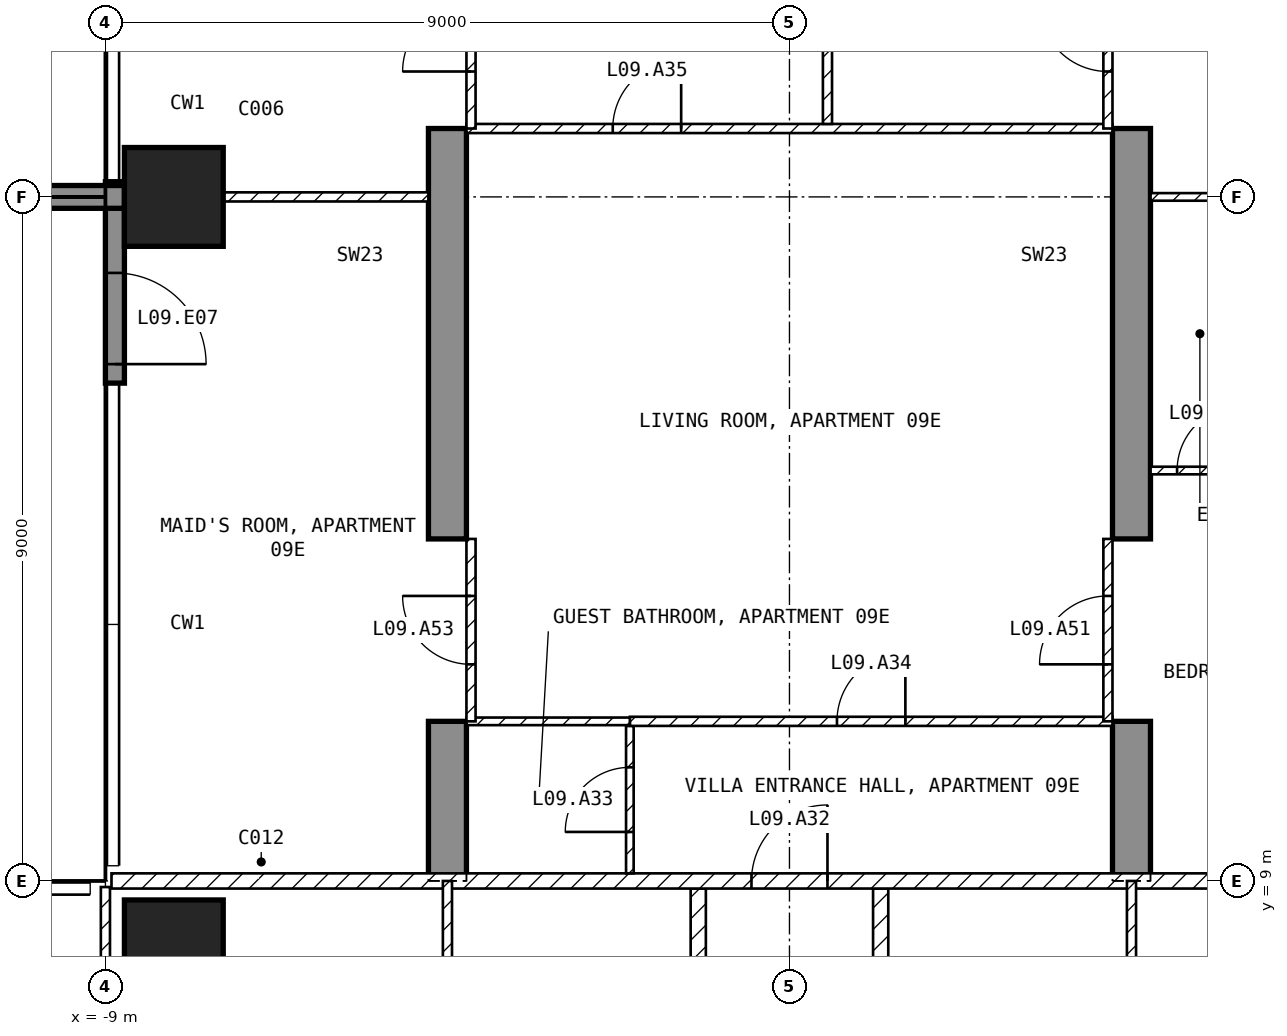
"""IFC4 building model, lengths in metres.
Left out: names, types, materials, properties, quantities, classifications, styles, units other than length and angle.
Written with IfcOpenShell. Run it as: python <this file> out.ifc"""

import sys

from ifc_helpers import new_model, si_unit, direction, frame, frame_2d, origin, origin_2d, place, context, subcontext, project, spatial, polyline, rectangle, outline, extrude, element, fill, save


model = new_model("IFC4")
c1 = context("Model", 3, precision=1e-05, world=origin(), true_north=direction((0.0, 1.0)))
c2 = subcontext(c1, "Body", "Model", "MODEL_VIEW")
j1 = project(units=[si_unit("LENGTHUNIT", "METRE"), si_unit("PLANEANGLEUNIT", "RADIAN")], contexts=[c1])
p1 = place(None, origin())
s1 = spatial("IfcSite", under=j1, at=p1, CompositionType="ELEMENT")
p2 = place(p1, origin())
s2 = spatial("IfcBuilding", under=s1, at=p2, CompositionType="ELEMENT")
p3 = place(p2, frame((0.0, 0.0, 50.5)))
s3 = spatial("IfcBuildingStorey", under=s2, at=p3, CompositionType="ELEMENT", Elevation=50.5)
for number, where, z_axis, x_axis in (
    (1, (-8.1, 8.1, -0.25), (0.0, 0.0, 1.0), (1.0, 0.0, 0.0)),
    (2, (-8.1, 18.0, -0.25), (0.0, 0.0, 1.0), (1.0, 0.0, 0.0)),
):
    element("IfcColumn", number, at=place(p3, frame(where, z_axis=z_axis, x_axis=x_axis)), inside=s3, PredefinedType="COLUMN", context=c2, shape_type="SweptSolid", body=[
        extrude(rectangle(XDim=1.3, YDim=1.3, at=origin_2d()), origin(), (0.0, 0.0, 1.0), 3.5),
    ])
for number, where, z_axis, x_axis in (
    (3, (-4.75, 9.0, -0.25), (1.0, 0.0, 0.0), (0.0, 1.0, 0.0)),
    (4, (4.25, 9.0, -0.25), (1.0, 0.0, 0.0), (0.0, 1.0, 0.0)),
):
    element("IfcWall", number, at=place(p3, frame(where, z_axis=z_axis, x_axis=x_axis)), inside=s3, PredefinedType="SHEAR", context=c2, shape_type="SweptSolid", body=[
        extrude(outline(polyline([(0.0, 0.0), (2.1, 0.0), (2.1, 2.65), (4.5, 2.65), (4.5, 0.0), (9.9, 0.0), (9.9, 2.65), (12.3, 2.65), (12.3, 0.0), (16.45, 0.0), (16.45, 3.5), (0.0, 3.5), (0.0, 0.0)])), origin(), (0.0, 0.0, 1.0), 0.5),
    ])
p4 = place(p3, frame((-8.875, 18.2, 0.0), z_axis=(0.0, 0.0, 1.0), x_axis=(0.0, -1.0, 0.0)))
e5 = element("IfcWall", 5, at=p4, inside=s3, PredefinedType="SOLIDWALL", context=c2, shape_type="SweptSolid", body=[
    extrude(rectangle(XDim=2.65, YDim=0.25, at=frame_2d((1.325, 0.0))), origin(), (0.0, 0.0, 1.0), 3.25),
])
p5 = place(p4, frame((1.2, 0.0, 0.0)))
e6 = element("IfcOpeningElement", 6, at=p5, cuts=e5, PredefinedType="OPENING", context=c2, shape_type="SweptSolid", body=[
    extrude(rectangle(XDim=1.2, YDim=2.4, at=frame_2d((0.6, 1.2))), frame((0.0, 0.135, 0.0), z_axis=(0.0, -1.0, 0.0), x_axis=(1.0, 0.0, 0.0)), (0.0, 0.0, 1.0), 0.27),
])
p6 = place(p3, frame((-8.75, 18.0, 0.0), z_axis=(0.0, 0.0, 1.0), x_axis=(-1.0, 0.0, 0.0)))
e7 = element("IfcWall", 7, at=p6, inside=s3, PredefinedType="SOLIDWALL", context=c2, shape_type="SweptSolid", body=[
    extrude(rectangle(XDim=2.95, YDim=0.3, at=frame_2d((1.475, 0.0))), origin(), (0.0, 0.0, 1.0), 3.25),
])
for number, where, z_axis, x_axis in (
    (8, (1.2, 8.9, 0.0), (0.0, 0.0, 1.0), (0.0, -1.0, 0.0)),
    (9, (-1.2, 1.3, 0.0), (0.0, 0.0, 1.0), (0.0, 1.0, 0.0)),
):
    element("IfcWall", number, at=place(p3, frame(where, z_axis=z_axis, x_axis=x_axis)), inside=s3, PredefinedType="PARTITIONING", context=c2, shape_type="SweptSolid", body=[
        extrude(rectangle(XDim=7.6, YDim=0.2, at=frame_2d((3.8, 0.0))), origin(), (0.0, 0.0, 1.0), 3.25),
    ])
p7 = place(p3, frame((-8.92, 9.0, 0.0), z_axis=(0.0, 0.0, 1.0), x_axis=(1.0, 0.0, 0.0)))
e10 = element("IfcWall", 10, at=p7, inside=s3, PredefinedType="PARTITIONING", context=c2, shape_type="SweptSolid", body=[
    extrude(rectangle(XDim=17.84, YDim=0.2, at=frame_2d((8.92, 0.0))), origin(), (0.0, 0.0, 1.0), 3.25),
])
p8 = place(p7, frame((8.42, 0.0, 0.0)))
e11 = element("IfcOpeningElement", 11, at=p8, cuts=e10, PredefinedType="OPENING", context=c2, shape_type="SweptSolid", body=[
    extrude(rectangle(XDim=1.0, YDim=2.1, at=frame_2d((0.5, 1.05))), frame((0.0, 0.11, 0.0), z_axis=(0.0, -1.0, 0.0), x_axis=(1.0, 0.0, 0.0)), (0.0, 0.0, 1.0), 0.22),
])
p9 = place(p3, frame((4.5, 1.3, 0.0), z_axis=(0.0, 0.0, 1.0), x_axis=(0.0, 1.0, 0.0)))
e12 = element("IfcWall", 12, at=p9, inside=s3, PredefinedType="PARTITIONING", context=c2, shape_type="SweptSolid", body=[
    extrude(rectangle(XDim=7.7, YDim=0.12, at=frame_2d((3.85, 0.0))), origin(), (0.0, 0.0, 1.0), 3.25),
])
p10 = place(p9, frame((3.4, 0.0, 0.0)))
e13 = element("IfcOpeningElement", 13, at=p10, cuts=e12, PredefinedType="OPENING", context=c2, shape_type="SweptSolid", body=[
    extrude(rectangle(XDim=0.9, YDim=2.1, at=frame_2d((0.45, 1.05))), frame((0.0, 0.07, 0.0), z_axis=(0.0, -1.0, 0.0), x_axis=(1.0, 0.0, 0.0)), (0.0, 0.0, 1.0), 0.14),
])
p11 = place(p3, frame((-9.0, 8.92, 0.0), z_axis=(0.0, 0.0, 1.0), x_axis=(0.0, -1.0, 0.0)))
e14 = element("IfcWall", 14, at=p11, inside=s3, PredefinedType="PARTITIONING", context=c2, shape_type="SweptSolid", body=[
    extrude(rectangle(XDim=7.62, YDim=0.12, at=frame_2d((3.81, 0.0))), origin(), (0.0, 0.0, 1.0), 3.25),
])
p12 = place(p11, frame((2.67, 0.0, 0.0)))
e15 = element("IfcOpeningElement", 15, at=p12, cuts=e14, PredefinedType="OPENING", context=c2, shape_type="SweptSolid", body=[
    extrude(rectangle(XDim=0.9, YDim=2.1, at=frame_2d((0.45, 1.05))), frame((0.0, 0.07, 0.0), z_axis=(0.0, -1.0, 0.0), x_axis=(1.0, 0.0, 0.0)), (0.0, 0.0, 1.0), 0.14),
])
p13 = place(p3, frame((-4.5, 9.0, 0.0), z_axis=(0.0, 0.0, 1.0), x_axis=(0.0, -1.0, 0.0)))
e16 = element("IfcWall", 16, at=p13, inside=s3, PredefinedType="PARTITIONING", context=c2, shape_type="SweptSolid", body=[
    extrude(rectangle(XDim=3.9, YDim=0.12, at=frame_2d((1.95, 0.0))), origin(), (0.0, 0.0, 1.0), 3.25),
])
p14 = place(p13, frame((1.5, 0.0, 0.0)))
e17 = element("IfcOpeningElement", 17, at=p14, cuts=e16, PredefinedType="OPENING", context=c2, shape_type="SweptSolid", body=[
    extrude(rectangle(XDim=0.9, YDim=2.1, at=frame_2d((0.45, 1.05))), frame((0.0, 0.07, 0.0), z_axis=(0.0, -1.0, 0.0), x_axis=(1.0, 0.0, 0.0)), (0.0, 0.0, 1.0), 0.14),
])
p15 = place(p3, frame((-2.1, 9.1, 0.0), z_axis=(0.0, 0.0, 1.0), x_axis=(0.0, 1.0, 0.0)))
e18 = element("IfcWall", 18, at=p15, inside=s3, PredefinedType="PARTITIONING", context=c2, shape_type="SweptSolid", body=[
    extrude(rectangle(XDim=1.94, YDim=0.1, at=frame_2d((0.97, 0.0))), origin(), (0.0, 0.0, 1.0), 3.25),
])
p16 = place(p15, frame((0.545, 0.0, 0.0)))
e19 = element("IfcOpeningElement", 19, at=p16, cuts=e18, PredefinedType="OPENING", context=c2, shape_type="SweptSolid", body=[
    extrude(rectangle(XDim=0.85, YDim=2.1, at=frame_2d((0.425, 1.05))), frame((0.0, 0.06, 0.0), z_axis=(0.0, -1.0, 0.0), x_axis=(1.0, 0.0, 0.0)), (0.0, 0.0, 1.0), 0.12),
])
p17 = place(p3, frame((-2.1, 11.1, 0.0), z_axis=(0.0, 0.0, 1.0), x_axis=(1.0, 0.0, 0.0)))
e20 = element("IfcWall", 20, at=p17, inside=s3, PredefinedType="PARTITIONING", context=c2, shape_type="SweptSolid", body=[
    extrude(rectangle(XDim=6.35, YDim=0.12, at=frame_2d((3.175, 0.0))), origin(), (0.0, 0.0, 1.0), 3.25),
])
p18 = place(p17, frame((2.725, 0.0, 0.0)))
e21 = element("IfcOpeningElement", 21, at=p18, cuts=e20, PredefinedType="OPENING", context=c2, shape_type="SweptSolid", body=[
    extrude(rectangle(XDim=0.9, YDim=2.1, at=frame_2d((0.45, 1.05))), frame((0.0, 0.07, 0.0), z_axis=(0.0, -1.0, 0.0), x_axis=(1.0, 0.0, 0.0)), (0.0, 0.0, 1.0), 0.14),
])
p19 = place(p3, frame((-4.25, 11.1, 0.0), z_axis=(0.0, 0.0, 1.0), x_axis=(1.0, 0.0, 0.0)))
e22 = element("IfcWall", 22, at=p19, inside=s3, PredefinedType="PARTITIONING", context=c2, shape_type="SweptSolid", body=[
    extrude(rectangle(XDim=2.15, YDim=0.1, at=frame_2d((1.075, 0.0))), origin(), (0.0, 0.0, 1.0), 3.25),
])
p20 = place(p3, frame((-4.25, 18.9, 0.0), z_axis=(0.0, 0.0, 1.0), x_axis=(1.0, 0.0, 0.0)))
e23 = element("IfcWall", 23, at=p20, inside=s3, PredefinedType="PARTITIONING", context=c2, shape_type="SweptSolid", body=[
    extrude(rectangle(XDim=8.5, YDim=0.12, at=frame_2d((4.25, 0.0))), origin(), (0.0, 0.0, 1.0), 3.25),
])
p21 = place(p20, frame((1.925, 0.0, 0.0)))
e24 = element("IfcOpeningElement", 24, at=p21, cuts=e23, PredefinedType="OPENING", context=c2, shape_type="SweptSolid", body=[
    extrude(rectangle(XDim=0.9, YDim=2.1, at=frame_2d((0.45, 1.05))), frame((0.0, 0.07, 0.0), z_axis=(0.0, -1.0, 0.0), x_axis=(1.0, 0.0, 0.0)), (0.0, 0.0, 1.0), 0.14),
])
p22 = place(p3, frame((0.5, 23.34, 0.0), z_axis=(0.0, 0.0, 1.0), x_axis=(0.0, -1.0, 0.0)))
e25 = element("IfcWall", 25, at=p22, inside=s3, PredefinedType="PARTITIONING", context=c2, shape_type="SweptSolid", body=[
    extrude(rectangle(XDim=4.38, YDim=0.12, at=frame_2d((2.19, 0.0))), origin(), (0.0, 0.0, 1.0), 3.25),
])
p23 = place(p22, frame((1.74, 0.0, 0.0)))
e26 = element("IfcOpeningElement", 26, at=p23, cuts=e25, PredefinedType="OPENING", context=c2, shape_type="SweptSolid", body=[
    extrude(rectangle(XDim=0.9, YDim=2.1, at=frame_2d((0.45, 1.05))), frame((0.0, 0.07, 0.0), z_axis=(0.0, -1.0, 0.0), x_axis=(1.0, 0.0, 0.0)), (0.0, 0.0, 1.0), 0.14),
])
p24 = place(p3, frame((4.75, 14.4, 0.0), z_axis=(0.0, 0.0, 1.0), x_axis=(1.0, 0.0, 0.0)))
e27 = element("IfcWall", 27, at=p24, inside=s3, PredefinedType="PARTITIONING", context=c2, shape_type="SweptSolid", body=[
    extrude(rectangle(XDim=1.6, YDim=0.1, at=frame_2d((0.8, 0.0))), origin(), (0.0, 0.0, 1.0), 3.25),
])
p25 = place(p24, frame((0.35, 0.0, 0.0)))
e28 = element("IfcOpeningElement", 28, at=p25, cuts=e27, PredefinedType="OPENING", context=c2, shape_type="SweptSolid", body=[
    extrude(rectangle(XDim=0.85, YDim=2.1, at=frame_2d((0.425, 1.05))), frame((0.0, 0.06, 0.0), z_axis=(0.0, -1.0, 0.0), x_axis=(1.0, 0.0, 0.0)), (0.0, 0.0, 1.0), 0.12),
])
p26 = place(p3, frame((4.75, 18.0, 0.0), z_axis=(0.0, 0.0, 1.0), x_axis=(1.0, 0.0, 0.0)))
e29 = element("IfcWall", 29, at=p26, inside=s3, PredefinedType="PARTITIONING", context=c2, shape_type="SweptSolid", body=[
    extrude(rectangle(XDim=1.55, YDim=0.1, at=frame_2d((0.775, 0.0))), origin(), (0.0, 0.0, 1.0), 2.346),
])
p27 = place(p3, frame((-7.45, 18.0, 0.0), z_axis=(0.0, 0.0, 1.0), x_axis=(1.0, 0.0, 0.0)))
e30 = element("IfcWall", 30, at=p27, inside=s3, PredefinedType="PARTITIONING", context=c2, shape_type="SweptSolid", body=[
    extrude(rectangle(XDim=2.7, YDim=0.12, at=frame_2d((1.35, 0.0))), origin(), (0.0, 0.0, 1.0), 2.346),
])
p28 = place(p3, frame((4.19, 11.1, 0.0), z_axis=(0.0, 0.0, 1.0), x_axis=(0.0, 1.0, 0.0)))
e31 = element("IfcWall", 31, at=p28, inside=s3, PredefinedType="PARTITIONING", context=c2, shape_type="SweptSolid", body=[
    extrude(rectangle(XDim=2.4, YDim=0.12, at=frame_2d((1.2, 0.0))), origin(), (0.0, 0.0, 1.0), 2.4),
])
p29 = place(p28, frame((0.75, 0.0, 0.0)))
e32 = element("IfcOpeningElement", 32, at=p29, cuts=e31, PredefinedType="OPENING", context=c2, shape_type="SweptSolid", body=[
    extrude(rectangle(XDim=0.9, YDim=2.1, at=frame_2d((0.45, 1.05))), frame((0.0, 0.07, 0.0), z_axis=(0.0, -1.0, 0.0), x_axis=(1.0, 0.0, 0.0)), (0.0, 0.0, 1.0), 0.14),
])
p30 = place(p3, frame((4.19, 18.9, 0.0), z_axis=(0.0, 0.0, 1.0), x_axis=(0.0, 1.0, 0.0)))
e33 = element("IfcWall", 33, at=p30, inside=s3, PredefinedType="PARTITIONING", context=c2, shape_type="SweptSolid", body=[
    extrude(rectangle(XDim=2.4, YDim=0.12, at=frame_2d((1.2, 0.0))), origin(), (0.0, 0.0, 1.0), 2.4),
])
p31 = place(p30, frame((0.75, 0.0, 0.0)))
e34 = element("IfcOpeningElement", 34, at=p31, cuts=e33, PredefinedType="OPENING", context=c2, shape_type="SweptSolid", body=[
    extrude(rectangle(XDim=0.9, YDim=2.1, at=frame_2d((0.45, 1.05))), frame((0.0, 0.07, 0.0), z_axis=(0.0, -1.0, 0.0), x_axis=(1.0, 0.0, 0.0)), (0.0, 0.0, 1.0), 0.14),
])
p32 = place(p3, frame((-4.19, 11.1, 0.0), z_axis=(0.0, 0.0, 1.0), x_axis=(0.0, 1.0, 0.0)))
e35 = element("IfcWall", 35, at=p32, inside=s3, PredefinedType="PARTITIONING", context=c2, shape_type="SweptSolid", body=[
    extrude(rectangle(XDim=2.4, YDim=0.12, at=frame_2d((1.2, 0.0))), origin(), (0.0, 0.0, 1.0), 2.4),
])
p33 = place(p32, frame((0.75, 0.0, 0.0)))
e36 = element("IfcOpeningElement", 36, at=p33, cuts=e35, PredefinedType="OPENING", context=c2, shape_type="SweptSolid", body=[
    extrude(rectangle(XDim=0.9, YDim=2.1, at=frame_2d((0.45, 1.05))), frame((0.0, 0.07, 0.0), z_axis=(0.0, -1.0, 0.0), x_axis=(1.0, 0.0, 0.0)), (0.0, 0.0, 1.0), 0.14),
])
p34 = place(p3, frame((-4.19, 18.9, 0.0), z_axis=(0.0, 0.0, 1.0), x_axis=(0.0, 1.0, 0.0)))
e37 = element("IfcWall", 37, at=p34, inside=s3, PredefinedType="PARTITIONING", context=c2, shape_type="SweptSolid", body=[
    extrude(rectangle(XDim=2.4, YDim=0.12, at=frame_2d((1.2, 0.0))), origin(), (0.0, 0.0, 1.0), 2.4),
])
p35 = place(p34, frame((0.75, 0.0, 0.0)))
e38 = element("IfcOpeningElement", 38, at=p35, cuts=e37, PredefinedType="OPENING", context=c2, shape_type="SweptSolid", body=[
    extrude(rectangle(XDim=0.9, YDim=2.1, at=frame_2d((0.45, 1.05))), frame((0.0, 0.07, 0.0), z_axis=(0.0, -1.0, 0.0), x_axis=(1.0, 0.0, 0.0)), (0.0, 0.0, 1.0), 0.14),
])
p36 = place(p5, origin())
e39 = element("IfcDoor", 39, at=p36, inside=s3, OperationType="SINGLE_SWING_RIGHT", PredefinedType="DOOR", context=c2, shape_type="SweptSolid", body=[
    extrude(rectangle(XDim=1.2, YDim=2.4, at=frame_2d((0.6, 1.2))), frame((0.0, 0.025, 0.0), z_axis=(0.0, -1.0, 0.0), x_axis=(1.0, 0.0, 0.0)), (0.0, 0.0, 1.0), 0.05),
])
fill(e6, e39)
p37 = place(p8, origin())
e40 = element("IfcDoor", 40, at=p37, inside=s3, OperationType="SINGLE_SWING_RIGHT", PredefinedType="DOOR", context=c2, shape_type="SweptSolid", body=[
    extrude(rectangle(XDim=1.0, YDim=2.1, at=frame_2d((0.5, 1.05))), frame((0.0, 0.025, 0.0), z_axis=(0.0, -1.0, 0.0), x_axis=(1.0, 0.0, 0.0)), (0.0, 0.0, 1.0), 0.05),
])
fill(e11, e40)
p38 = place(p16, origin())
e41 = element("IfcDoor", 41, at=p38, inside=s3, OperationType="SINGLE_SWING_LEFT", PredefinedType="DOOR", context=c2, shape_type="SweptSolid", body=[
    extrude(rectangle(XDim=0.85, YDim=2.1, at=frame_2d((0.425, 1.05))), frame((0.0, 0.025, 0.0), z_axis=(0.0, -1.0, 0.0), x_axis=(1.0, 0.0, 0.0)), (0.0, 0.0, 1.0), 0.05),
])
fill(e19, e41)
p39 = place(p18, origin())
e42 = element("IfcDoor", 42, at=p39, inside=s3, OperationType="SINGLE_SWING_RIGHT", PredefinedType="DOOR", context=c2, shape_type="SweptSolid", body=[
    extrude(rectangle(XDim=0.9, YDim=2.1, at=frame_2d((0.45, 1.05))), frame((0.0, 0.025, 0.0), z_axis=(0.0, -1.0, 0.0), x_axis=(1.0, 0.0, 0.0)), (0.0, 0.0, 1.0), 0.05),
])
fill(e21, e42)
p40 = place(p21, origin())
e43 = element("IfcDoor", 43, at=p40, inside=s3, OperationType="SINGLE_SWING_RIGHT", PredefinedType="DOOR", context=c2, shape_type="SweptSolid", body=[
    extrude(rectangle(XDim=0.9, YDim=2.1, at=frame_2d((0.45, 1.05))), frame((0.0, 0.025, 0.0), z_axis=(0.0, -1.0, 0.0), x_axis=(1.0, 0.0, 0.0)), (0.0, 0.0, 1.0), 0.05),
])
fill(e24, e43)
p41 = place(p25, origin())
e44 = element("IfcDoor", 44, at=p41, inside=s3, OperationType="SINGLE_SWING_RIGHT", PredefinedType="DOOR", context=c2, shape_type="SweptSolid", body=[
    extrude(rectangle(XDim=0.85, YDim=2.1, at=frame_2d((0.425, 1.05))), frame((0.0, 0.025, 0.0), z_axis=(0.0, -1.0, 0.0), x_axis=(1.0, 0.0, 0.0)), (0.0, 0.0, 1.0), 0.05),
])
fill(e28, e44)
p42 = place(p29, origin())
e45 = element("IfcDoor", 45, at=p42, inside=s3, OperationType="SINGLE_SWING_LEFT", PredefinedType="DOOR", context=c2, shape_type="SweptSolid", body=[
    extrude(rectangle(XDim=0.9, YDim=2.1, at=frame_2d((0.45, 1.05))), frame((0.0, 0.025, 0.0), z_axis=(0.0, -1.0, 0.0), x_axis=(1.0, 0.0, 0.0)), (0.0, 0.0, 1.0), 0.05),
])
fill(e32, e45)
p43 = place(p31, origin())
e46 = element("IfcDoor", 46, at=p43, inside=s3, OperationType="SINGLE_SWING_RIGHT", PredefinedType="DOOR", context=c2, shape_type="SweptSolid", body=[
    extrude(rectangle(XDim=0.9, YDim=2.1, at=frame_2d((0.45, 1.05))), frame((0.0, 0.025, 0.0), z_axis=(0.0, -1.0, 0.0), x_axis=(1.0, 0.0, 0.0)), (0.0, 0.0, 1.0), 0.05),
])
fill(e34, e46)
p44 = place(p33, origin())
e47 = element("IfcDoor", 47, at=p44, inside=s3, OperationType="SINGLE_SWING_RIGHT", PredefinedType="DOOR", context=c2, shape_type="SweptSolid", body=[
    extrude(rectangle(XDim=0.9, YDim=2.1, at=frame_2d((0.45, 1.05))), frame((0.0, 0.025, 0.0), z_axis=(0.0, -1.0, 0.0), x_axis=(1.0, 0.0, 0.0)), (0.0, 0.0, 1.0), 0.05),
])
fill(e36, e47)
p45 = place(p35, origin())
e48 = element("IfcDoor", 48, at=p45, inside=s3, OperationType="SINGLE_SWING_LEFT", PredefinedType="DOOR", context=c2, shape_type="SweptSolid", body=[
    extrude(rectangle(XDim=0.9, YDim=2.1, at=frame_2d((0.45, 1.05))), frame((0.0, 0.025, 0.0), z_axis=(0.0, -1.0, 0.0), x_axis=(1.0, 0.0, 0.0)), (0.0, 0.0, 1.0), 0.05),
])
fill(e38, e48)
save(model, sys.argv[1])
